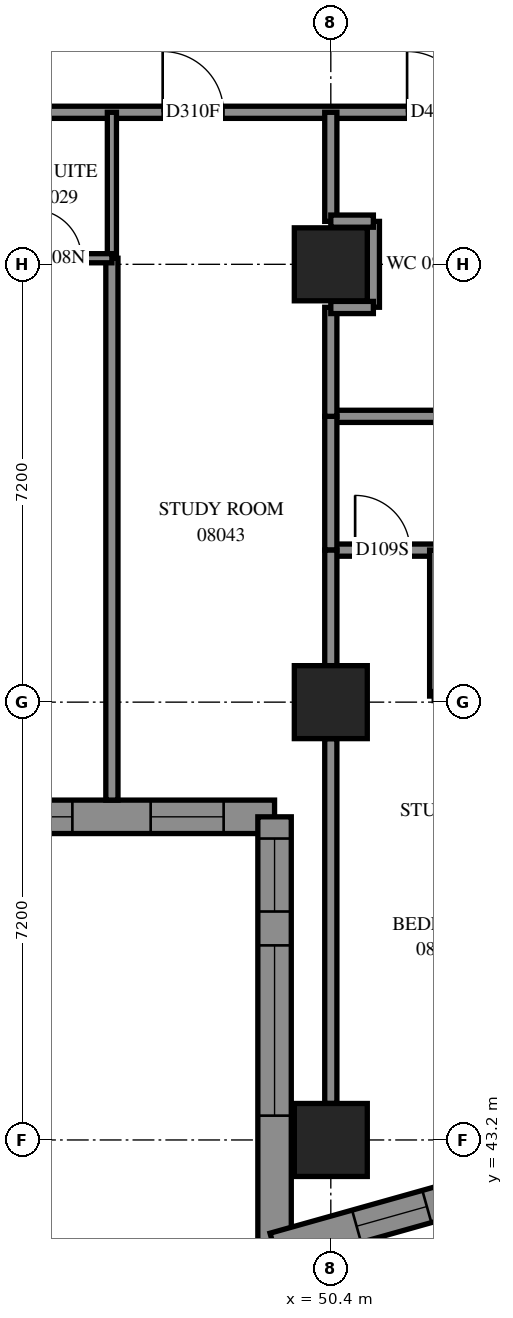
"""IFC4 building model, lengths in metres.
Left out: names, types, materials, properties, quantities, classifications, styles, units other than length and angle.
Written with IfcOpenShell. Run it as: python <this file> out.ifc"""

import sys

from ifc_helpers import new_model, si_unit, direction, frame, frame_2d, origin, origin_2d, place, context, subcontext, project, spatial, polyline, rectangle, outline, extrude, element, fill, save


model = new_model("IFC4")
c1 = context("Model", 3, precision=1e-05, world=origin(), true_north=direction((0.0, 1.0)))
c2 = subcontext(c1, "Body", "Model", "MODEL_VIEW")
j1 = project(units=[si_unit("LENGTHUNIT", "METRE"), si_unit("PLANEANGLEUNIT", "RADIAN")], contexts=[c1])
p1 = place(None, origin())
s1 = spatial("IfcSite", under=j1, at=p1, CompositionType="ELEMENT")
p2 = place(p1, origin())
s2 = spatial("IfcBuilding", under=s1, at=p2, CompositionType="ELEMENT")
p3 = place(p2, frame((0.0, 0.0, 33.8)))
s3 = spatial("IfcBuildingStorey", under=s2, at=p3, CompositionType="ELEMENT", Elevation=33.8)
for number, where, z_axis, x_axis in (
    (1, (50.4, 43.2, 0.0), (0.0, 0.0, 1.0), (1.0, 0.0, 0.0)),
    (2, (50.4, 50.4, 0.0), (0.0, 0.0, 1.0), (1.0, 0.0, 0.0)),
    (3, (50.4, 57.6, 0.0), (0.0, 0.0, 1.0), (1.0, 0.0, 0.0)),
):
    element("IfcColumn", number, at=place(p3, frame(where, z_axis=z_axis, x_axis=x_axis)), inside=s3, PredefinedType="COLUMN", context=c2, shape_type="SweptSolid", body=[
        extrude(rectangle(XDim=1.2, YDim=1.2, at=origin_2d()), origin(), (0.0, 0.0, 1.0), 3.1),
    ])
p4 = place(p3, frame((35.075, 48.514, 0.0), z_axis=(0.0, 0.0, 1.0), x_axis=(1.0, 0.0, 0.0)))
e4 = element("IfcWall", 4, at=p4, inside=s3, PredefinedType="SOLIDWALL", context=c2, shape_type="SweptSolid", body=[
    extrude(outline(polyline([(-0.275, -0.275), (14.125, -0.275), (14.675, 0.275), (0.275, 0.275), (-0.275, -0.275)])), origin(), (0.0, 0.0, 1.0), 3.1),
])
p5 = place(p4, frame((1.325, 0.0, 0.5)))
e5 = element("IfcOpeningElement", 5, at=p5, cuts=e4, PredefinedType="OPENING", context=c2, shape_type="SweptSolid", body=[
    extrude(rectangle(XDim=2.8, YDim=2.45, at=frame_2d((1.4, 1.225))), frame((0.0, 0.285, 0.0), z_axis=(0.0, -1.0, 0.0), x_axis=(1.0, 0.0, 0.0)), (0.0, 0.0, 1.0), 0.57),
])
p6 = place(p4, frame((4.925, 0.0, 0.5)))
e6 = element("IfcOpeningElement", 6, at=p6, cuts=e4, PredefinedType="OPENING", context=c2, shape_type="SweptSolid", body=[
    extrude(rectangle(XDim=2.8, YDim=2.45, at=frame_2d((1.4, 1.225))), frame((0.0, 0.285, 0.0), z_axis=(0.0, -1.0, 0.0), x_axis=(1.0, 0.0, 0.0)), (0.0, 0.0, 1.0), 0.57),
])
p7 = place(p4, frame((8.275, 0.0, 0.5)))
e7 = element("IfcOpeningElement", 7, at=p7, cuts=e4, PredefinedType="OPENING", context=c2, shape_type="SweptSolid", body=[
    extrude(rectangle(XDim=2.8, YDim=2.45, at=frame_2d((1.4, 1.225))), frame((0.0, 0.285, 0.0), z_axis=(0.0, -1.0, 0.0), x_axis=(1.0, 0.0, 0.0)), (0.0, 0.0, 1.0), 0.57),
])
p8 = place(p4, frame((12.363, 0.0, 0.5)))
e8 = element("IfcOpeningElement", 8, at=p8, cuts=e4, PredefinedType="OPENING", context=c2, shape_type="SweptSolid", body=[
    extrude(rectangle(XDim=1.2, YDim=2.45, at=frame_2d((0.6, 1.225))), frame((0.0, 0.285, 0.0), z_axis=(0.0, -1.0, 0.0), x_axis=(1.0, 0.0, 0.0)), (0.0, 0.0, 1.0), 0.57),
])
p9 = place(p3, frame((49.475, 48.514, 0.0), z_axis=(0.0, 0.0, 1.0), x_axis=(0.0, -1.0, 0.0)))
e9 = element("IfcWall", 9, at=p9, inside=s3, PredefinedType="SOLIDWALL", context=c2, shape_type="SweptSolid", body=[
    extrude(outline(polyline([(0.275, -0.275), (7.475, -0.275), (6.749, 0.275), (-0.275, 0.275), (0.275, -0.275)])), origin(), (0.0, 0.0, 1.0), 3.1),
])
p10 = place(p9, frame((2.114, 0.0, 0.5)))
e10 = element("IfcOpeningElement", 10, at=p10, cuts=e9, PredefinedType="OPENING", context=c2, shape_type="SweptSolid", body=[
    extrude(rectangle(XDim=2.8, YDim=2.45, at=frame_2d((1.4, 1.225))), frame((0.0, 0.285, 0.0), z_axis=(0.0, -1.0, 0.0), x_axis=(1.0, 0.0, 0.0)), (0.0, 0.0, 1.0), 0.57),
])
p11 = place(p9, frame((0.357, 0.0, 0.5)))
e11 = element("IfcOpeningElement", 11, at=p11, cuts=e9, PredefinedType="OPENING", context=c2, shape_type="SweptSolid", body=[
    extrude(rectangle(XDim=1.2, YDim=2.45, at=frame_2d((0.6, 1.225))), frame((0.0, 0.285, 0.0), z_axis=(0.0, -1.0, 0.0), x_axis=(1.0, 0.0, 0.0)), (0.0, 0.0, 1.0), 0.57),
])
p12 = place(p3, frame((49.475, 41.402, 0.0), z_axis=(0.0, 0.0, 1.0), x_axis=(0.9627079474, 0.2705428024, 0.0)))
e12 = element("IfcWall", 12, at=p12, inside=s3, PredefinedType="SOLIDWALL", context=c2, shape_type="SweptSolid", body=[
    extrude(outline(polyline([(-0.363, -0.275), (3.189, -0.275), (3.295, 0.275), (0.363, 0.275), (-0.363, -0.275)])), origin(), (0.0, 0.0, 1.0), 3.1),
])
p13 = place(p12, frame((1.401, 0.0, 0.5)))
e13 = element("IfcOpeningElement", 13, at=p13, cuts=e12, PredefinedType="OPENING", context=c2, shape_type="SweptSolid", body=[
    extrude(rectangle(XDim=1.2, YDim=2.45, at=frame_2d((0.6, 1.225))), frame((0.0, 0.285, 0.0), z_axis=(0.0, -1.0, 0.0), x_axis=(1.0, 0.0, 0.0)), (0.0, 0.0, 1.0), 0.57),
])
p14 = place(p3, frame((28.8, 60.1, 0.0), z_axis=(0.0, 0.0, 1.0), x_axis=(1.0, 0.0, 0.0)))
e14 = element("IfcWall", 14, at=p14, inside=s3, PredefinedType="PARTITIONING", context=c2, shape_type="SweptSolid", body=[
    extrude(rectangle(XDim=24.1, YDim=0.2, at=frame_2d((12.05, 0.0))), origin(), (0.0, 0.0, 1.0), 3.1),
])
p15 = place(p14, frame((4.125, 0.0, 0.0)))
e15 = element("IfcOpeningElement", 15, at=p15, cuts=e14, PredefinedType="OPENING", context=c2, shape_type="SweptSolid", body=[
    extrude(rectangle(XDim=1.0, YDim=2.1, at=frame_2d((0.5, 1.05))), frame((0.0, 0.11, 0.0), z_axis=(0.0, -1.0, 0.0), x_axis=(1.0, 0.0, 0.0)), (0.0, 0.0, 1.0), 0.22),
])
p16 = place(p14, frame((11.62, 0.0, 0.0)))
e16 = element("IfcOpeningElement", 16, at=p16, cuts=e14, PredefinedType="OPENING", context=c2, shape_type="SweptSolid", body=[
    extrude(rectangle(XDim=0.9, YDim=2.1, at=frame_2d((0.45, 1.05))), frame((0.0, 0.11, 0.0), z_axis=(0.0, -1.0, 0.0), x_axis=(1.0, 0.0, 0.0)), (0.0, 0.0, 1.0), 0.22),
])
p17 = place(p14, frame((14.8, 0.0, 0.0)))
e17 = element("IfcOpeningElement", 17, at=p17, cuts=e14, PredefinedType="OPENING", context=c2, shape_type="SweptSolid", body=[
    extrude(rectangle(XDim=0.9, YDim=2.1, at=frame_2d((0.45, 1.05))), frame((0.0, 0.11, 0.0), z_axis=(0.0, -1.0, 0.0), x_axis=(1.0, 0.0, 0.0)), (0.0, 0.0, 1.0), 0.22),
])
p18 = place(p14, frame((18.835, 0.0, 0.0)))
e18 = element("IfcOpeningElement", 18, at=p18, cuts=e14, PredefinedType="OPENING", context=c2, shape_type="SweptSolid", body=[
    extrude(rectangle(XDim=1.0, YDim=2.1, at=frame_2d((0.5, 1.05))), frame((0.0, 0.11, 0.0), z_axis=(0.0, -1.0, 0.0), x_axis=(1.0, 0.0, 0.0)), (0.0, 0.0, 1.0), 0.22),
])
p19 = place(p14, frame((22.854, 0.0, 0.0)))
e19 = element("IfcOpeningElement", 19, at=p19, cuts=e14, PredefinedType="OPENING", context=c2, shape_type="SweptSolid", body=[
    extrude(rectangle(XDim=1.0, YDim=2.1, at=frame_2d((0.5, 1.05))), frame((0.0, 0.11, 0.0), z_axis=(0.0, -1.0, 0.0), x_axis=(1.0, 0.0, 0.0)), (0.0, 0.0, 1.0), 0.22),
])
p20 = place(p3, frame((46.8, 48.789, 0.0), z_axis=(0.0, 0.0, 1.0), x_axis=(0.0, 1.0, 0.0)))
e20 = element("IfcWall", 20, at=p20, inside=s3, PredefinedType="PARTITIONING", context=c2, shape_type="SweptSolid", body=[
    extrude(rectangle(XDim=8.911, YDim=0.2, at=frame_2d((4.455, 0.0))), origin(), (0.0, 0.0, 1.0), 3.1),
])
p21 = place(p3, frame((50.4, 43.8, 0.0), z_axis=(0.0, 0.0, 1.0), x_axis=(0.0, 1.0, 0.0)))
e21 = element("IfcWall", 21, at=p21, inside=s3, PredefinedType="PARTITIONING", context=c2, shape_type="SweptSolid", body=[
    extrude(rectangle(XDim=6.0, YDim=0.2, at=frame_2d((3.0, 0.0))), origin(), (0.0, 0.0, 1.0), 2.6),
])
p22 = place(p3, frame((50.4, 52.9, 0.0), z_axis=(0.0, 0.0, 1.0), x_axis=(1.0, 0.0, 0.0)))
e22 = element("IfcWall", 22, at=p22, inside=s3, PredefinedType="PARTITIONING", context=c2, shape_type="SweptSolid", body=[
    extrude(rectangle(XDim=4.1, YDim=0.2, at=frame_2d((2.05, 0.0))), origin(), (0.0, 0.0, 1.0), 3.1),
])
p23 = place(p22, frame((0.4, 0.0, 0.0)))
e23 = element("IfcOpeningElement", 23, at=p23, cuts=e22, PredefinedType="OPENING", context=c2, shape_type="SweptSolid", body=[
    extrude(rectangle(XDim=0.9, YDim=2.1, at=frame_2d((0.45, 1.05))), frame((0.0, 0.11, 0.0), z_axis=(0.0, -1.0, 0.0), x_axis=(1.0, 0.0, 0.0)), (0.0, 0.0, 1.0), 0.22),
])
p24 = place(p3, frame((50.4, 55.1, 0.0), z_axis=(0.0, 0.0, 1.0), x_axis=(1.0, 0.0, 0.0)))
e24 = element("IfcWall", 24, at=p24, inside=s3, PredefinedType="PARTITIONING", context=c2, shape_type="SweptSolid", body=[
    extrude(rectangle(XDim=2.5, YDim=0.2, at=frame_2d((1.25, 0.0))), origin(), (0.0, 0.0, 1.0), 3.1),
])
for number, where, z_axis, x_axis in (
    (25, (46.8, 57.7, 0.0), (0.0, 0.0, 1.0), (0.0, 1.0, 0.0)),
    (26, (52.1, 50.5, 0.0), (0.0, 0.0, 1.0), (0.0, 1.0, 0.0)),
):
    element("IfcWall", number, at=place(p3, frame(where, z_axis=z_axis, x_axis=x_axis)), inside=s3, PredefinedType="PARTITIONING", context=c2, shape_type="SweptSolid", body=[
        extrude(rectangle(XDim=2.4, YDim=0.15, at=frame_2d((1.2, 0.0))), origin(), (0.0, 0.0, 1.0), 3.1),
    ])
p25 = place(p3, frame((50.4, 52.9, 0.0), z_axis=(0.0, 0.0, 1.0), x_axis=(0.0, 1.0, 0.0)))
e27 = element("IfcWall", 27, at=p25, inside=s3, PredefinedType="PARTITIONING", context=c2, shape_type="SweptSolid", body=[
    extrude(rectangle(XDim=2.2, YDim=0.2, at=frame_2d((1.1, 0.0))), origin(), (0.0, 0.0, 1.0), 3.1),
])
p26 = place(p3, frame((44.9, 57.7, 0.0), z_axis=(0.0, 0.0, 1.0), x_axis=(1.0, 0.0, 0.0)))
e28 = element("IfcWall", 28, at=p26, inside=s3, PredefinedType="PARTITIONING", context=c2, shape_type="SweptSolid", body=[
    extrude(rectangle(XDim=1.9, YDim=0.15, at=frame_2d((0.95, 0.0))), origin(), (0.0, 0.0, 1.0), 3.1),
])
p27 = place(p26, frame((0.598, 0.0, 0.0)))
e29 = element("IfcOpeningElement", 29, at=p27, cuts=e28, PredefinedType="OPENING", context=c2, shape_type="SweptSolid", body=[
    extrude(rectangle(XDim=0.8, YDim=2.1, at=frame_2d((0.4, 1.05))), frame((0.0, 0.085, 0.0), z_axis=(0.0, -1.0, 0.0), x_axis=(1.0, 0.0, 0.0)), (0.0, 0.0, 1.0), 0.17),
])
p28 = place(p3, frame((50.4, 51.0, 0.0), z_axis=(0.0, 0.0, 1.0), x_axis=(0.0, 1.0, 0.0)))
e30 = element("IfcWall", 30, at=p28, inside=s3, PredefinedType="PARTITIONING", context=c2, shape_type="SweptSolid", body=[
    extrude(rectangle(XDim=1.9, YDim=0.2, at=frame_2d((0.95, 0.0))), origin(), (0.0, 0.0, 1.0), 3.1),
])
for number, where, z_axis, x_axis in (
    (31, (50.4, 58.306, 0.0), (0.0, 0.0, 1.0), (0.0, 1.0, 0.0)),
    (32, (50.4, 55.1, 0.0), (0.0, 0.0, 1.0), (0.0, 1.0, 0.0)),
):
    element("IfcWall", number, at=place(p3, frame(where, z_axis=z_axis, x_axis=x_axis)), inside=s3, PredefinedType="PARTITIONING", context=c2, shape_type="SweptSolid", body=[
        extrude(rectangle(XDim=1.794, YDim=0.2, at=frame_2d((0.897, 0.0))), origin(), (0.0, 0.0, 1.0), 3.1),
    ])
p29 = place(p3, frame((51.1, 56.894, 0.0), z_axis=(0.0, 0.0, 1.0), x_axis=(0.0, 1.0, 0.0)))
e33 = element("IfcWall", 33, at=p29, inside=s3, PredefinedType="PARTITIONING", context=c2, shape_type="SweptSolid", body=[
    extrude(rectangle(XDim=1.412, YDim=0.2, at=frame_2d((0.706, 0.0))), origin(), (0.0, 0.0, 1.0), 3.1),
])
for number, where, z_axis, x_axis in (
    (34, (50.4, 58.31, 0.0), (0.0, 0.0, 1.0), (1.0, 0.0, 0.0)),
    (35, (50.4, 56.89, 0.0), (0.0, 0.0, 1.0), (1.0, 0.0, 0.0)),
):
    element("IfcWall", number, at=place(p3, frame(where, z_axis=z_axis, x_axis=x_axis)), inside=s3, PredefinedType="PARTITIONING", context=c2, shape_type="SweptSolid", body=[
        extrude(rectangle(XDim=0.7, YDim=0.2, at=frame_2d((0.35, 0.0))), origin(), (0.0, 0.0, 1.0), 3.1),
    ])
p30 = place(p7, origin())
e36 = element("IfcWindow", 36, at=p30, inside=s3, PartitioningType="SINGLE_PANEL", PredefinedType="WINDOW", context=c2, shape_type="SweptSolid", body=[
    extrude(rectangle(XDim=2.8, YDim=2.45, at=frame_2d((1.4, 1.225))), frame((0.0, 0.155, 0.0), z_axis=(0.0, -1.0, 0.0), x_axis=(1.0, 0.0, 0.0)), (0.0, 0.0, 1.0), 0.06),
])
fill(e7, e36)
p31 = place(p8, origin())
e37 = element("IfcWindow", 37, at=p31, inside=s3, PartitioningType="SINGLE_PANEL", PredefinedType="WINDOW", context=c2, shape_type="SweptSolid", body=[
    extrude(rectangle(XDim=1.2, YDim=2.45, at=frame_2d((0.6, 1.225))), frame((0.0, 0.155, 0.0), z_axis=(0.0, -1.0, 0.0), x_axis=(1.0, 0.0, 0.0)), (0.0, 0.0, 1.0), 0.06),
])
fill(e8, e37)
p32 = place(p10, origin())
e38 = element("IfcWindow", 38, at=p32, inside=s3, PartitioningType="SINGLE_PANEL", PredefinedType="WINDOW", context=c2, shape_type="SweptSolid", body=[
    extrude(rectangle(XDim=2.8, YDim=2.45, at=frame_2d((1.4, 1.225))), frame((0.0, 0.155, 0.0), z_axis=(0.0, -1.0, 0.0), x_axis=(1.0, 0.0, 0.0)), (0.0, 0.0, 1.0), 0.06),
])
fill(e10, e38)
p33 = place(p11, origin())
e39 = element("IfcWindow", 39, at=p33, inside=s3, PartitioningType="SINGLE_PANEL", PredefinedType="WINDOW", context=c2, shape_type="SweptSolid", body=[
    extrude(rectangle(XDim=1.2, YDim=2.45, at=frame_2d((0.6, 1.225))), frame((0.0, 0.155, 0.0), z_axis=(0.0, -1.0, 0.0), x_axis=(1.0, 0.0, 0.0)), (0.0, 0.0, 1.0), 0.06),
])
fill(e11, e39)
p34 = place(p13, origin())
e40 = element("IfcWindow", 40, at=p34, inside=s3, PartitioningType="SINGLE_PANEL", PredefinedType="WINDOW", context=c2, shape_type="SweptSolid", body=[
    extrude(rectangle(XDim=1.2, YDim=2.45, at=frame_2d((0.6, 1.225))), frame((0.0, 0.155, 0.0), z_axis=(0.0, -1.0, 0.0), x_axis=(1.0, 0.0, 0.0)), (0.0, 0.0, 1.0), 0.06),
])
fill(e13, e40)
p35 = place(p27, origin())
e41 = element("IfcDoor", 41, at=p35, inside=s3, OperationType="SINGLE_SWING_RIGHT", PredefinedType="DOOR", context=c2, shape_type="SweptSolid", body=[
    extrude(rectangle(XDim=0.8, YDim=2.1, at=frame_2d((0.4, 1.05))), frame((0.0, 0.025, 0.0), z_axis=(0.0, -1.0, 0.0), x_axis=(1.0, 0.0, 0.0)), (0.0, 0.0, 1.0), 0.05),
])
fill(e29, e41)
p36 = place(p18, origin())
e42 = element("IfcDoor", 42, at=p36, inside=s3, OperationType="SINGLE_SWING_RIGHT", PredefinedType="DOOR", context=c2, shape_type="SweptSolid", body=[
    extrude(rectangle(XDim=1.0, YDim=2.1, at=frame_2d((0.5, 1.05))), frame((0.0, 0.025, 0.0), z_axis=(0.0, -1.0, 0.0), x_axis=(1.0, 0.0, 0.0)), (0.0, 0.0, 1.0), 0.05),
])
fill(e18, e42)
p37 = place(p19, origin())
e43 = element("IfcDoor", 43, at=p37, inside=s3, OperationType="SINGLE_SWING_LEFT", PredefinedType="DOOR", context=c2, shape_type="SweptSolid", body=[
    extrude(rectangle(XDim=1.0, YDim=2.1, at=frame_2d((0.5, 1.05))), frame((0.0, 0.025, 0.0), z_axis=(0.0, -1.0, 0.0), x_axis=(1.0, 0.0, 0.0)), (0.0, 0.0, 1.0), 0.05),
])
fill(e19, e43)
p38 = place(p23, origin())
e44 = element("IfcDoor", 44, at=p38, inside=s3, OperationType="SINGLE_SWING_LEFT", PredefinedType="DOOR", context=c2, shape_type="SweptSolid", body=[
    extrude(rectangle(XDim=0.9, YDim=2.1, at=frame_2d((0.45, 1.05))), frame((0.0, 0.025, 0.0), z_axis=(0.0, -1.0, 0.0), x_axis=(1.0, 0.0, 0.0)), (0.0, 0.0, 1.0), 0.05),
])
fill(e23, e44)
save(model, sys.argv[1])
